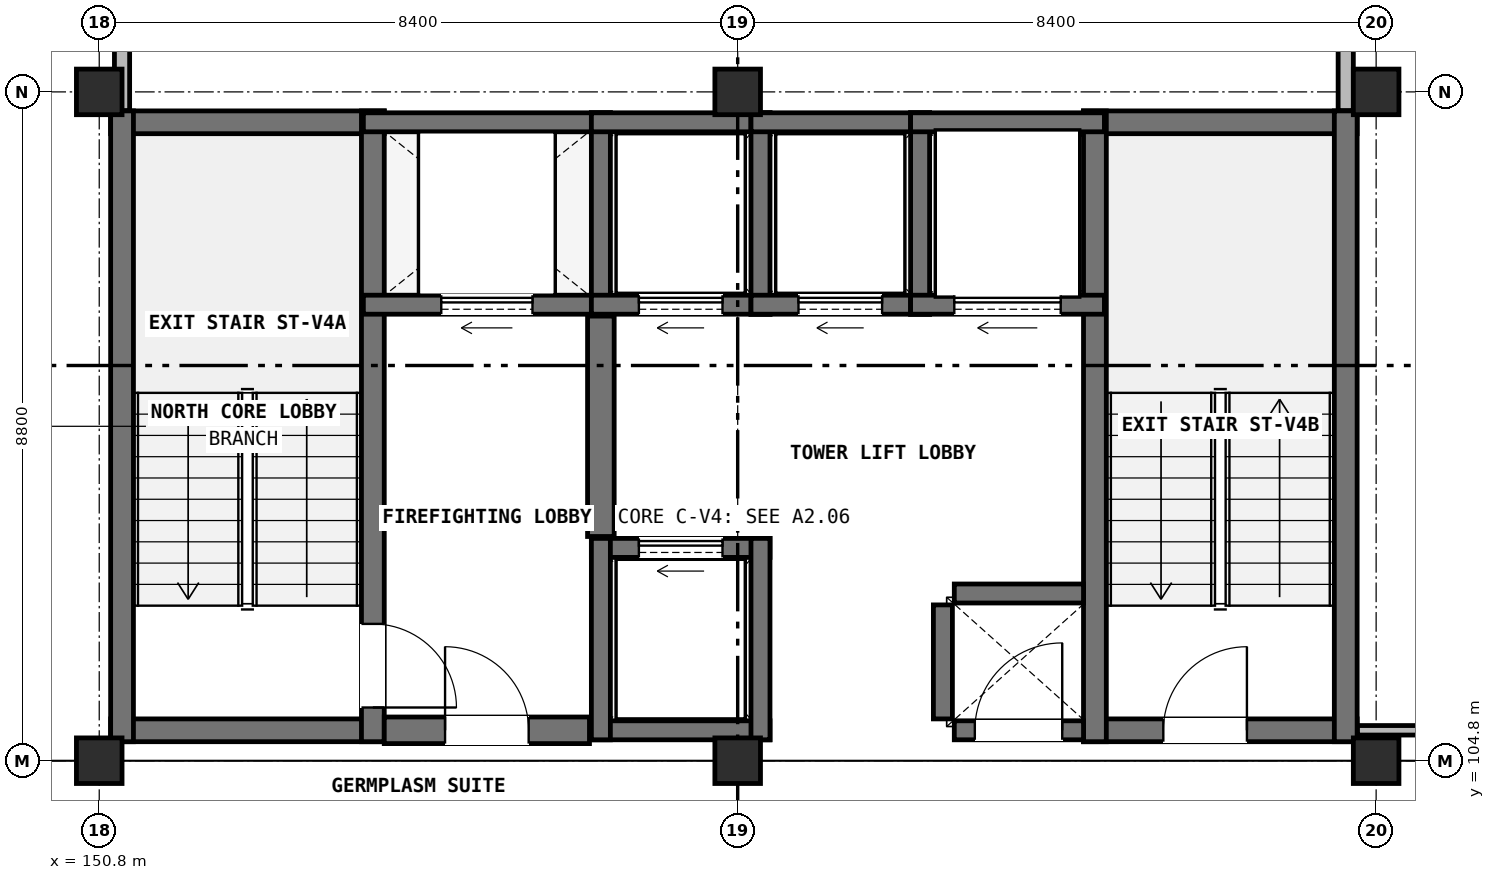
"""IFC4 building model, lengths in metres.
Left out: names, types, materials, properties, quantities, classifications, styles, units other than length and angle.
Written with IfcOpenShell. Run it as: python <this file> out.ifc"""

import sys

from ifc_helpers import new_model, si_unit, direction, frame, frame_2d, origin, origin_2d, place, context, subcontext, project, spatial, rectangle, extrude, element, fill, save


model = new_model("IFC4")
c1 = context("Model", 3, precision=1e-05, world=origin(), true_north=direction((0.0, 1.0)))
c2 = subcontext(c1, "Body", "Model", "MODEL_VIEW")
j1 = project(units=[si_unit("LENGTHUNIT", "METRE"), si_unit("PLANEANGLEUNIT", "RADIAN")], contexts=[c1])
p1 = place(None, origin())
s1 = spatial("IfcSite", under=j1, at=p1, CompositionType="ELEMENT")
p2 = place(p1, origin())
s2 = spatial("IfcBuilding", under=s1, at=p2, CompositionType="ELEMENT")
p3 = place(p2, frame((0.0, 0.0, 44.4)))
s3 = spatial("IfcBuildingStorey", under=s2, at=p3, CompositionType="ELEMENT", Elevation=44.4)
for number, where, z_axis, x_axis in (
    (1, (150.8, 104.8, 0.0), (0.0, 0.0, 1.0), (1.0, 0.0, 0.0)),
    (2, (150.8, 113.6, 0.0), (0.0, 0.0, 1.0), (1.0, 0.0, 0.0)),
    (3, (159.2, 104.8, 0.0), (0.0, 0.0, 1.0), (1.0, 0.0, 0.0)),
    (4, (159.2, 113.6, 0.0), (0.0, 0.0, 1.0), (1.0, 0.0, 0.0)),
    (5, (167.6, 104.8, 0.0), (0.0, 0.0, 1.0), (1.0, 0.0, 0.0)),
    (6, (167.6, 113.6, 0.0), (0.0, 0.0, 1.0), (1.0, 0.0, 0.0)),
):
    element("IfcColumn", number, at=place(p3, frame(where, z_axis=z_axis, x_axis=x_axis)), inside=s3, PredefinedType="COLUMN", context=c2, shape_type="SweptSolid", body=[
        extrude(rectangle(XDim=0.6, YDim=0.6, at=origin_2d()), origin(), (0.0, 0.0, 1.0), 3.8),
    ])
for number, where, z_axis, x_axis in (
    (7, (150.95, 105.2, 0.0), (0.0, 0.0, 1.0), (1.0, 0.0, 0.0)),
    (8, (150.95, 113.2, 0.0), (0.0, 0.0, 1.0), (1.0, 0.0, 0.0)),
):
    element("IfcWall", number, at=place(p3, frame(where, z_axis=z_axis, x_axis=x_axis)), inside=s3, PredefinedType="SHEAR", context=c2, shape_type="SweptSolid", body=[
        extrude(rectangle(XDim=3.6, YDim=0.3, at=frame_2d((1.8, 0.0))), origin(), (0.0, 0.0, 1.0), 3.8),
    ])
p4 = place(p3, frame((151.1, 105.05, 0.0), z_axis=(0.0, 0.0, 1.0), x_axis=(0.0, 1.0, 0.0)))
e9 = element("IfcWall", 9, at=p4, inside=s3, PredefinedType="SHEAR", context=c2, shape_type="SweptSolid", body=[
    extrude(rectangle(XDim=8.3, YDim=0.3, at=frame_2d((4.15, 0.0))), origin(), (0.0, 0.0, 1.0), 3.8),
])
p5 = place(p3, frame((154.4, 105.05, 0.0), z_axis=(0.0, 0.0, 1.0), x_axis=(0.0, 1.0, 0.0)))
e10 = element("IfcWall", 10, at=p5, inside=s3, PredefinedType="SHEAR", context=c2, shape_type="SweptSolid", body=[
    extrude(rectangle(XDim=8.3, YDim=0.3, at=frame_2d((4.15, 0.0))), origin(), (0.0, 0.0, 1.0), 3.8),
])
p6 = place(p5, frame((0.45, 0.0, 0.0)))
e11 = element("IfcOpeningElement", 11, at=p6, cuts=e10, PredefinedType="OPENING", context=c2, shape_type="SweptSolid", body=[
    extrude(rectangle(XDim=1.1, YDim=2.2, at=frame_2d((0.55, 1.1))), frame((0.0, 0.16, 0.0), z_axis=(0.0, -1.0, 0.0), x_axis=(1.0, 0.0, 0.0)), (0.0, 0.0, 1.0), 0.32),
])
p7 = place(p3, frame((163.75, 105.2, 0.0), z_axis=(0.0, 0.0, 1.0), x_axis=(1.0, 0.0, 0.0)))
e12 = element("IfcWall", 12, at=p7, inside=s3, PredefinedType="SHEAR", context=c2, shape_type="SweptSolid", body=[
    extrude(rectangle(XDim=3.6, YDim=0.3, at=frame_2d((1.8, 0.0))), origin(), (0.0, 0.0, 1.0), 3.8),
])
p8 = place(p7, frame((1.05, 0.0, 0.0)))
e13 = element("IfcOpeningElement", 13, at=p8, cuts=e12, PredefinedType="OPENING", context=c2, shape_type="SweptSolid", body=[
    extrude(rectangle(XDim=1.1, YDim=2.2, at=frame_2d((0.55, 1.1))), frame((0.0, 0.16, 0.0), z_axis=(0.0, -1.0, 0.0), x_axis=(1.0, 0.0, 0.0)), (0.0, 0.0, 1.0), 0.32),
])
p9 = place(p3, frame((163.75, 113.2, 0.0), z_axis=(0.0, 0.0, 1.0), x_axis=(1.0, 0.0, 0.0)))
e14 = element("IfcWall", 14, at=p9, inside=s3, PredefinedType="SHEAR", context=c2, shape_type="SweptSolid", body=[
    extrude(rectangle(XDim=3.6, YDim=0.3, at=frame_2d((1.8, 0.0))), origin(), (0.0, 0.0, 1.0), 3.8),
])
for number, where, z_axis, x_axis in (
    (15, (163.9, 105.05, 0.0), (0.0, 0.0, 1.0), (0.0, 1.0, 0.0)),
    (16, (167.2, 105.05, 0.0), (0.0, 0.0, 1.0), (0.0, 1.0, 0.0)),
):
    element("IfcWall", number, at=place(p3, frame(where, z_axis=z_axis, x_axis=x_axis)), inside=s3, PredefinedType="SHEAR", context=c2, shape_type="SweptSolid", body=[
        extrude(rectangle(XDim=8.3, YDim=0.3, at=frame_2d((4.15, 0.0))), origin(), (0.0, 0.0, 1.0), 3.8),
    ])
p10 = place(p3, frame((154.275, 110.8, 0.0), z_axis=(0.0, 0.0, 1.0), x_axis=(1.0, 0.0, 0.0)))
e17 = element("IfcWall", 17, at=p10, inside=s3, PredefinedType="SOLIDWALL", context=c2, shape_type="SweptSolid", body=[
    extrude(rectangle(XDim=3.25, YDim=0.25, at=frame_2d((1.625, 0.0))), origin(), (0.0, 0.0, 1.0), 3.48),
])
p11 = place(p10, frame((1.025, 0.0, 0.0)))
e18 = element("IfcOpeningElement", 18, at=p11, cuts=e17, PredefinedType="OPENING", context=c2, shape_type="SweptSolid", body=[
    extrude(rectangle(XDim=1.2, YDim=2.2, at=frame_2d((0.6, 1.1))), frame((0.0, 0.135, 0.0), z_axis=(0.0, -1.0, 0.0), x_axis=(1.0, 0.0, 0.0)), (0.0, 0.0, 1.0), 0.27),
])
p12 = place(p3, frame((154.275, 113.2, 0.0), z_axis=(0.0, 0.0, 1.0), x_axis=(1.0, 0.0, 0.0)))
e19 = element("IfcWall", 19, at=p12, inside=s3, PredefinedType="SOLIDWALL", context=c2, shape_type="SweptSolid", body=[
    extrude(rectangle(XDim=3.25, YDim=0.25, at=frame_2d((1.625, 0.0))), origin(), (0.0, 0.0, 1.0), 3.48),
])
p13 = place(p3, frame((157.4, 110.675, 0.0), z_axis=(0.0, 0.0, 1.0), x_axis=(0.0, 1.0, 0.0)))
e20 = element("IfcWall", 20, at=p13, inside=s3, PredefinedType="SOLIDWALL", context=c2, shape_type="SweptSolid", body=[
    extrude(rectangle(XDim=2.65, YDim=0.25, at=frame_2d((1.325, 0.0))), origin(), (0.0, 0.0, 1.0), 3.48),
])
p14 = place(p3, frame((157.275, 110.8, 0.0), z_axis=(0.0, 0.0, 1.0), x_axis=(1.0, 0.0, 0.0)))
e21 = element("IfcWall", 21, at=p14, inside=s3, PredefinedType="SOLIDWALL", context=c2, shape_type="SweptSolid", body=[
    extrude(rectangle(XDim=2.35, YDim=0.25, at=frame_2d((1.175, 0.0))), origin(), (0.0, 0.0, 1.0), 3.48),
])
p15 = place(p14, frame((0.625, 0.0, 0.0)))
e22 = element("IfcOpeningElement", 22, at=p15, cuts=e21, PredefinedType="OPENING", context=c2, shape_type="SweptSolid", body=[
    extrude(rectangle(XDim=1.1, YDim=2.2, at=frame_2d((0.55, 1.1))), frame((0.0, 0.135, 0.0), z_axis=(0.0, -1.0, 0.0), x_axis=(1.0, 0.0, 0.0)), (0.0, 0.0, 1.0), 0.27),
])
p16 = place(p3, frame((157.275, 113.2, 0.0), z_axis=(0.0, 0.0, 1.0), x_axis=(1.0, 0.0, 0.0)))
e23 = element("IfcWall", 23, at=p16, inside=s3, PredefinedType="SOLIDWALL", context=c2, shape_type="SweptSolid", body=[
    extrude(rectangle(XDim=2.35, YDim=0.25, at=frame_2d((1.175, 0.0))), origin(), (0.0, 0.0, 1.0), 3.48),
])
p17 = place(p3, frame((159.5, 110.675, 0.0), z_axis=(0.0, 0.0, 1.0), x_axis=(0.0, 1.0, 0.0)))
e24 = element("IfcWall", 24, at=p17, inside=s3, PredefinedType="SOLIDWALL", context=c2, shape_type="SweptSolid", body=[
    extrude(rectangle(XDim=2.65, YDim=0.25, at=frame_2d((1.325, 0.0))), origin(), (0.0, 0.0, 1.0), 3.48),
])
p18 = place(p3, frame((159.375, 110.8, 0.0), z_axis=(0.0, 0.0, 1.0), x_axis=(1.0, 0.0, 0.0)))
e25 = element("IfcWall", 25, at=p18, inside=s3, PredefinedType="SOLIDWALL", context=c2, shape_type="SweptSolid", body=[
    extrude(rectangle(XDim=2.35, YDim=0.25, at=frame_2d((1.175, 0.0))), origin(), (0.0, 0.0, 1.0), 3.48),
])
p19 = place(p18, frame((0.625, 0.0, 0.0)))
e26 = element("IfcOpeningElement", 26, at=p19, cuts=e25, PredefinedType="OPENING", context=c2, shape_type="SweptSolid", body=[
    extrude(rectangle(XDim=1.1, YDim=2.2, at=frame_2d((0.55, 1.1))), frame((0.0, 0.135, 0.0), z_axis=(0.0, -1.0, 0.0), x_axis=(1.0, 0.0, 0.0)), (0.0, 0.0, 1.0), 0.27),
])
p20 = place(p3, frame((159.375, 113.2, 0.0), z_axis=(0.0, 0.0, 1.0), x_axis=(1.0, 0.0, 0.0)))
e27 = element("IfcWall", 27, at=p20, inside=s3, PredefinedType="SOLIDWALL", context=c2, shape_type="SweptSolid", body=[
    extrude(rectangle(XDim=2.35, YDim=0.25, at=frame_2d((1.175, 0.0))), origin(), (0.0, 0.0, 1.0), 3.48),
])
p21 = place(p3, frame((161.6, 110.675, 0.0), z_axis=(0.0, 0.0, 1.0), x_axis=(0.0, 1.0, 0.0)))
e28 = element("IfcWall", 28, at=p21, inside=s3, PredefinedType="SOLIDWALL", context=c2, shape_type="SweptSolid", body=[
    extrude(rectangle(XDim=2.65, YDim=0.25, at=frame_2d((1.325, 0.0))), origin(), (0.0, 0.0, 1.0), 3.48),
])
p22 = place(p3, frame((157.275, 105.2, 0.0), z_axis=(0.0, 0.0, 1.0), x_axis=(1.0, 0.0, 0.0)))
e29 = element("IfcWall", 29, at=p22, inside=s3, PredefinedType="SOLIDWALL", context=c2, shape_type="SweptSolid", body=[
    extrude(rectangle(XDim=2.35, YDim=0.25, at=frame_2d((1.175, 0.0))), origin(), (0.0, 0.0, 1.0), 3.48),
])
p23 = place(p3, frame((157.275, 107.6, 0.0), z_axis=(0.0, 0.0, 1.0), x_axis=(1.0, 0.0, 0.0)))
e30 = element("IfcWall", 30, at=p23, inside=s3, PredefinedType="SOLIDWALL", context=c2, shape_type="SweptSolid", body=[
    extrude(rectangle(XDim=2.35, YDim=0.25, at=frame_2d((1.175, 0.0))), origin(), (0.0, 0.0, 1.0), 3.48),
])
p24 = place(p23, frame((0.625, 0.0, 0.0)))
e31 = element("IfcOpeningElement", 31, at=p24, cuts=e30, PredefinedType="OPENING", context=c2, shape_type="SweptSolid", body=[
    extrude(rectangle(XDim=1.1, YDim=2.2, at=frame_2d((0.55, 1.1))), frame((0.0, 0.135, 0.0), z_axis=(0.0, -1.0, 0.0), x_axis=(1.0, 0.0, 0.0)), (0.0, 0.0, 1.0), 0.27),
])
for number, where, z_axis, x_axis in (
    (32, (157.4, 105.075, 0.0), (0.0, 0.0, 1.0), (0.0, 1.0, 0.0)),
    (33, (159.5, 105.075, 0.0), (0.0, 0.0, 1.0), (0.0, 1.0, 0.0)),
):
    element("IfcWall", number, at=place(p3, frame(where, z_axis=z_axis, x_axis=x_axis)), inside=s3, PredefinedType="SOLIDWALL", context=c2, shape_type="SweptSolid", body=[
        extrude(rectangle(XDim=2.65, YDim=0.25, at=frame_2d((1.325, 0.0))), origin(), (0.0, 0.0, 1.0), 3.48),
    ])
p25 = place(p3, frame((161.475, 110.8, 0.0), z_axis=(0.0, 0.0, 1.0), x_axis=(1.0, 0.0, 0.0)))
e34 = element("IfcWall", 34, at=p25, inside=s3, PredefinedType="SOLIDWALL", context=c2, shape_type="SweptSolid", body=[
    extrude(rectangle(XDim=2.55, YDim=0.25, at=frame_2d((1.275, 0.0))), origin(), (0.0, 0.0, 1.0), 3.48),
])
p26 = place(p25, frame((0.575, 0.0, 0.0)))
e35 = element("IfcOpeningElement", 35, at=p26, cuts=e34, PredefinedType="OPENING", context=c2, shape_type="SweptSolid", body=[
    extrude(rectangle(XDim=1.4, YDim=2.3, at=frame_2d((0.7, 1.15))), frame((0.0, 0.135, 0.0), z_axis=(0.0, -1.0, 0.0), x_axis=(1.0, 0.0, 0.0)), (0.0, 0.0, 1.0), 0.27),
])
p27 = place(p3, frame((161.475, 113.2, 0.0), z_axis=(0.0, 0.0, 1.0), x_axis=(1.0, 0.0, 0.0)))
e36 = element("IfcWall", 36, at=p27, inside=s3, PredefinedType="SOLIDWALL", context=c2, shape_type="SweptSolid", body=[
    extrude(rectangle(XDim=2.55, YDim=0.25, at=frame_2d((1.275, 0.0))), origin(), (0.0, 0.0, 1.0), 3.48),
])
p28 = place(p3, frame((157.4, 107.75, 0.0), z_axis=(0.0, 0.0, 1.0), x_axis=(0.0, 1.0, 0.0)))
e37 = element("IfcWall", 37, at=p28, inside=s3, PredefinedType="SHEAR", context=c2, shape_type="SweptSolid", body=[
    extrude(rectangle(XDim=2.9, YDim=0.35, at=frame_2d((1.45, 0.0))), origin(), (0.0, 0.0, 1.0), 3.48),
])
p29 = place(p3, frame((154.55, 105.2, 0.0), z_axis=(0.0, 0.0, 1.0), x_axis=(1.0, 0.0, 0.0)))
e38 = element("IfcWall", 38, at=p29, inside=s3, PredefinedType="SHEAR", context=c2, shape_type="SweptSolid", body=[
    extrude(rectangle(XDim=2.7, YDim=0.35, at=frame_2d((1.35, 0.0))), origin(), (0.0, 0.0, 1.0), 3.48),
])
p30 = place(p29, frame((0.8, 0.0, 0.0)))
e39 = element("IfcOpeningElement", 39, at=p30, cuts=e38, PredefinedType="OPENING", context=c2, shape_type="SweptSolid", body=[
    extrude(rectangle(XDim=1.1, YDim=2.2, at=frame_2d((0.55, 1.1))), frame((0.0, 0.185, 0.0), z_axis=(0.0, -1.0, 0.0), x_axis=(1.0, 0.0, 0.0)), (0.0, 0.0, 1.0), 0.37),
])
p31 = place(p3, frame((161.9, 105.35, 0.0), z_axis=(0.0, 0.0, 1.0), x_axis=(0.0, 1.0, 0.0)))
e40 = element("IfcWall", 40, at=p31, inside=s3, PredefinedType="SOLIDWALL", context=c2, shape_type="SweptSolid", body=[
    extrude(rectangle(XDim=1.5, YDim=0.25, at=frame_2d((0.75, 0.0))), origin(), (0.0, 0.0, 1.0), 3.48),
])
p32 = place(p3, frame((162.05, 107.0, 0.0), z_axis=(0.0, 0.0, 1.0), x_axis=(1.0, 0.0, 0.0)))
e41 = element("IfcWall", 41, at=p32, inside=s3, PredefinedType="SOLIDWALL", context=c2, shape_type="SweptSolid", body=[
    extrude(rectangle(XDim=1.7, YDim=0.25, at=frame_2d((0.85, 0.0))), origin(), (0.0, 0.0, 1.0), 3.48),
])
p33 = place(p3, frame((162.05, 105.2, 0.0), z_axis=(0.0, 0.0, 1.0), x_axis=(1.0, 0.0, 0.0)))
e42 = element("IfcWall", 42, at=p33, inside=s3, PredefinedType="SOLIDWALL", context=c2, shape_type="SweptSolid", body=[
    extrude(rectangle(XDim=1.7, YDim=0.25, at=frame_2d((0.85, 0.0))), origin(), (0.0, 0.0, 1.0), 3.48),
])
p34 = place(p33, frame((0.27, 0.0, 0.0)))
e43 = element("IfcOpeningElement", 43, at=p34, cuts=e42, PredefinedType="OPENING", context=c2, shape_type="SweptSolid", body=[
    extrude(rectangle(XDim=1.15, YDim=2.2, at=frame_2d((0.575, 1.1))), frame((0.0, 0.135, 0.0), z_axis=(0.0, -1.0, 0.0), x_axis=(1.0, 0.0, 0.0)), (0.0, 0.0, 1.0), 0.27),
])
p35 = place(p3, frame((167.355, 105.2, 0.0), z_axis=(0.0, 0.0, 1.0), x_axis=(1.0, 0.0, 0.0)))
e44 = element("IfcWall", 44, at=p35, inside=s3, PredefinedType="PARTITIONING", context=c2, shape_type="SweptSolid", body=[
    extrude(rectangle(XDim=4.245, YDim=0.125, at=frame_2d((2.123, 0.0))), origin(), (0.0, 0.0, 1.0), 3.045),
])
p36 = place(p35, frame((1.633, 0.0, 0.0)))
e45 = element("IfcOpeningElement", 45, at=p36, cuts=e44, PredefinedType="OPENING", context=c2, shape_type="SweptSolid", body=[
    extrude(rectangle(XDim=0.98, YDim=2.1, at=frame_2d((0.49, 1.05))), frame((0.0, 0.073, 0.0), z_axis=(0.0, -1.0, 0.0), x_axis=(1.0, 0.0, 0.0)), (0.0, 0.0, 1.0), 0.145),
])
p37 = place(p3, frame((151.1, 113.355, 0.0), z_axis=(0.0, 0.0, 1.0), x_axis=(0.0, 1.0, 0.0)))
e46 = element("IfcWall", 46, at=p37, inside=s3, PredefinedType="PARTITIONING", context=c2, shape_type="SweptSolid", body=[
    extrude(rectangle(XDim=6.045, YDim=0.2, at=frame_2d((3.022, 0.0))), origin(), (0.0, 0.0, 1.0), 3.045),
])
p38 = place(p37, frame((2.448, 0.0, 0.0)))
e47 = element("IfcOpeningElement", 47, at=p38, cuts=e46, PredefinedType="OPENING", context=c2, shape_type="SweptSolid", body=[
    extrude(rectangle(XDim=1.15, YDim=2.2, at=frame_2d((0.575, 1.1))), frame((0.0, 0.11, 0.0), z_axis=(0.0, -1.0, 0.0), x_axis=(1.0, 0.0, 0.0)), (0.0, 0.0, 1.0), 0.22),
])
p39 = place(p3, frame((167.2, 113.355, 0.0), z_axis=(0.0, 0.0, 1.0), x_axis=(0.0, 1.0, 0.0)))
e48 = element("IfcWall", 48, at=p39, inside=s3, PredefinedType="PARTITIONING", context=c2, shape_type="SweptSolid", body=[
    extrude(rectangle(XDim=8.89, YDim=0.2, at=frame_2d((4.445, 0.0))), origin(), (0.0, 0.0, 1.0), 3.045),
])
p40 = place(p6, frame((1.1, 0.0, 0.0), z_axis=(0.0, 0.0, 1.0), x_axis=(-1.0, 0.0, 0.0)))
e49 = element("IfcDoor", 49, at=p40, inside=s3, OperationType="SINGLE_SWING_LEFT", PredefinedType="DOOR", context=c2, shape_type="SweptSolid", body=[
    extrude(rectangle(XDim=1.1, YDim=2.2, at=frame_2d((0.55, 1.1))), frame((0.0, 0.025, 0.0), z_axis=(0.0, -1.0, 0.0), x_axis=(1.0, 0.0, 0.0)), (0.0, 0.0, 1.0), 0.05),
])
fill(e11, e49)
p41 = place(p8, origin())
e50 = element("IfcDoor", 50, at=p41, inside=s3, OperationType="SINGLE_SWING_RIGHT", PredefinedType="DOOR", context=c2, shape_type="SweptSolid", body=[
    extrude(rectangle(XDim=1.1, YDim=2.2, at=frame_2d((0.55, 1.1))), frame((0.0, 0.025, 0.0), z_axis=(0.0, -1.0, 0.0), x_axis=(1.0, 0.0, 0.0)), (0.0, 0.0, 1.0), 0.05),
])
fill(e13, e50)
p42 = place(p11, origin())
e51 = element("IfcDoor", 51, at=p42, inside=s3, OperationType="SLIDING_TO_LEFT", PredefinedType="DOOR", context=c2, shape_type="SweptSolid", body=[
    extrude(rectangle(XDim=1.2, YDim=2.2, at=frame_2d((0.6, 1.1))), frame((0.0, 0.025, 0.0), z_axis=(0.0, -1.0, 0.0), x_axis=(1.0, 0.0, 0.0)), (0.0, 0.0, 1.0), 0.05),
])
fill(e18, e51)
p43 = place(p15, origin())
e52 = element("IfcDoor", 52, at=p43, inside=s3, OperationType="SLIDING_TO_LEFT", PredefinedType="DOOR", context=c2, shape_type="SweptSolid", body=[
    extrude(rectangle(XDim=1.1, YDim=2.2, at=frame_2d((0.55, 1.1))), frame((0.0, 0.025, 0.0), z_axis=(0.0, -1.0, 0.0), x_axis=(1.0, 0.0, 0.0)), (0.0, 0.0, 1.0), 0.05),
])
fill(e22, e52)
p44 = place(p19, origin())
e53 = element("IfcDoor", 53, at=p44, inside=s3, OperationType="SLIDING_TO_LEFT", PredefinedType="DOOR", context=c2, shape_type="SweptSolid", body=[
    extrude(rectangle(XDim=1.1, YDim=2.2, at=frame_2d((0.55, 1.1))), frame((0.0, 0.025, 0.0), z_axis=(0.0, -1.0, 0.0), x_axis=(1.0, 0.0, 0.0)), (0.0, 0.0, 1.0), 0.05),
])
fill(e26, e53)
p45 = place(p24, origin())
e54 = element("IfcDoor", 54, at=p45, inside=s3, OperationType="SLIDING_TO_LEFT", PredefinedType="DOOR", context=c2, shape_type="SweptSolid", body=[
    extrude(rectangle(XDim=1.1, YDim=2.2, at=frame_2d((0.55, 1.1))), frame((0.0, 0.025, 0.0), z_axis=(0.0, -1.0, 0.0), x_axis=(1.0, 0.0, 0.0)), (0.0, 0.0, 1.0), 0.05),
])
fill(e31, e54)
p46 = place(p26, origin())
e55 = element("IfcDoor", 55, at=p46, inside=s3, OperationType="SLIDING_TO_LEFT", PredefinedType="DOOR", context=c2, shape_type="SweptSolid", body=[
    extrude(rectangle(XDim=1.4, YDim=2.3, at=frame_2d((0.7, 1.15))), frame((0.0, 0.025, 0.0), z_axis=(0.0, -1.0, 0.0), x_axis=(1.0, 0.0, 0.0)), (0.0, 0.0, 1.0), 0.05),
])
fill(e35, e55)
p47 = place(p30, origin())
e56 = element("IfcDoor", 56, at=p47, inside=s3, OperationType="SINGLE_SWING_LEFT", PredefinedType="DOOR", context=c2, shape_type="SweptSolid", body=[
    extrude(rectangle(XDim=1.1, YDim=2.2, at=frame_2d((0.55, 1.1))), frame((0.0, 0.025, 0.0), z_axis=(0.0, -1.0, 0.0), x_axis=(1.0, 0.0, 0.0)), (0.0, 0.0, 1.0), 0.05),
])
fill(e39, e56)
p48 = place(p34, origin())
e57 = element("IfcDoor", 57, at=p48, inside=s3, OperationType="SINGLE_SWING_RIGHT", PredefinedType="DOOR", context=c2, shape_type="SweptSolid", body=[
    extrude(rectangle(XDim=1.15, YDim=2.2, at=frame_2d((0.575, 1.1))), frame((0.0, 0.025, 0.0), z_axis=(0.0, -1.0, 0.0), x_axis=(1.0, 0.0, 0.0)), (0.0, 0.0, 1.0), 0.05),
])
fill(e43, e57)
save(model, sys.argv[1])
